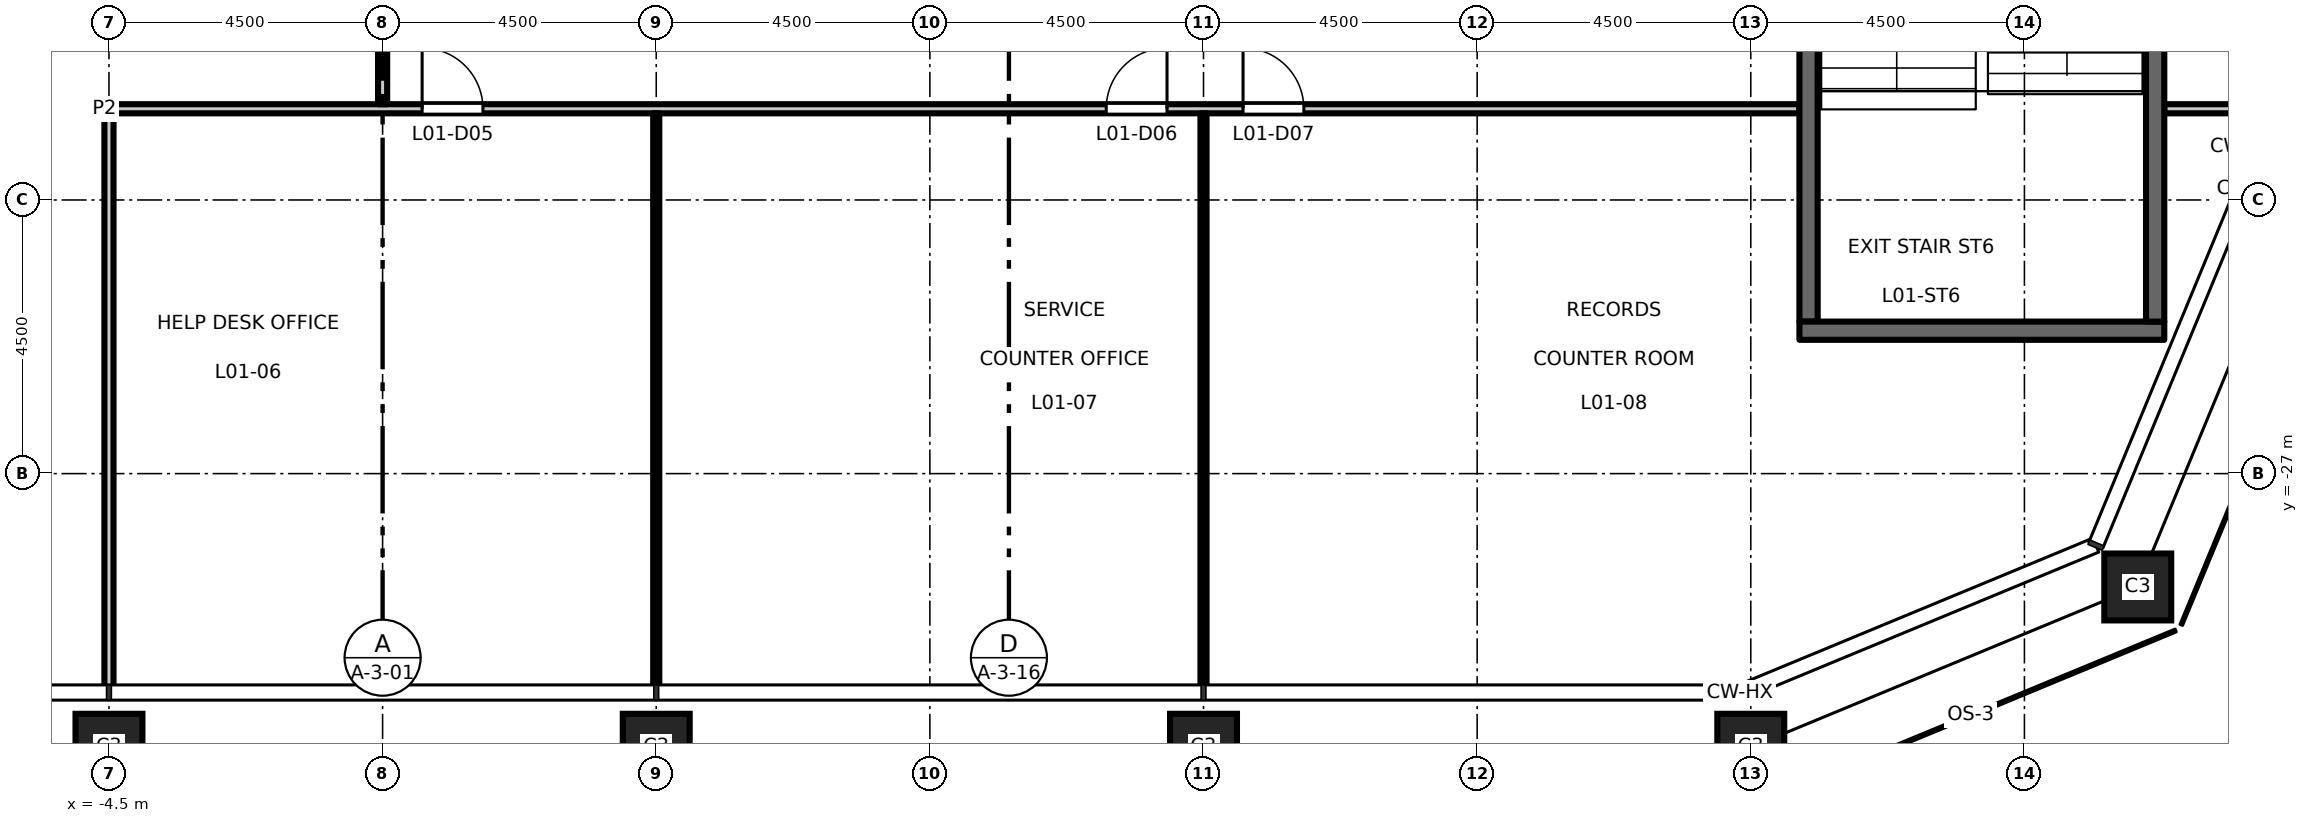
"""IFC4 building model, lengths in metres.
Left out: names, types, materials, properties, quantities, classifications, styles, units other than length and angle.
Written with IfcOpenShell. Run it as: python <this file> out.ifc"""

import sys

from ifc_helpers import new_model, si_unit, direction, frame, frame_2d, origin, origin_2d, place, context, subcontext, project, spatial, rectangle, hollow_rectangle, extrude, element, fill, save


model = new_model("IFC4")
c1 = context("Model", 3, precision=1e-05, world=origin(), true_north=direction((0.0, 1.0)))
c2 = subcontext(c1, "Body", "Model", "MODEL_VIEW")
j1 = project(units=[si_unit("LENGTHUNIT", "METRE"), si_unit("PLANEANGLEUNIT", "RADIAN")], contexts=[c1])
p1 = place(None, origin())
s1 = spatial("IfcSite", under=j1, at=p1, CompositionType="ELEMENT")
p2 = place(p1, origin())
s2 = spatial("IfcBuilding", under=s1, at=p2, CompositionType="ELEMENT")
p3 = place(p2, frame((0.0, 0.0, 7.2)))
s3 = spatial("IfcBuildingStorey", under=s2, at=p3, CompositionType="ELEMENT", Elevation=7.2)
for number, where, z_axis, x_axis in (
    (1, (-4.5, -31.5, 0.0), (0.0, 0.0, 1.0), (1.0, 0.0, 0.0)),
    (2, (4.5, -31.5, 0.0), (0.0, 0.0, 1.0), (1.0, 0.0, 0.0)),
    (3, (13.5, -31.5, 0.0), (0.0, 0.0, 1.0), (1.0, 0.0, 0.0)),
    (4, (22.5, -31.5, 0.0), (0.0, 0.0, 1.0), (1.0, 0.0, 0.0)),
    (5, (28.864, -28.864, 0.0), (0.0, 0.0, 1.0), (1.0, 0.0, 0.0)),
):
    element("IfcColumn", number, at=place(p3, frame(where, z_axis=z_axis, x_axis=x_axis)), inside=s3, PredefinedType="COLUMN", context=c2, shape_type="SweptSolid", body=[
        extrude(hollow_rectangle(XDim=1.1, YDim=1.1, WallThickness=0.07, at=origin_2d()), origin(), (0.0, 0.0, 1.0), 5.0),
    ])
p4 = place(p3, frame((23.45, -14.3, 0.0), z_axis=(0.0, 0.0, 1.0), x_axis=(0.0, -1.0, 0.0)))
e6 = element("IfcWall", 6, at=p4, inside=s3, PredefinedType="SHEAR", context=c2, shape_type="SweptSolid", body=[
    extrude(rectangle(XDim=10.2, YDim=0.3, at=frame_2d((5.1, 0.0))), origin(), (0.0, 0.0, 1.0), 4.8),
])
p5 = place(p4, frame((0.2, 0.0, 0.0)))
e7 = element("IfcOpeningElement", 7, at=p5, cuts=e6, PredefinedType="OPENING", context=c2, shape_type="SweptSolid", body=[
    extrude(rectangle(XDim=1.8, YDim=2.1, at=frame_2d((0.9, 1.05))), frame((0.0, 0.16, 0.0), z_axis=(0.0, -1.0, 0.0), x_axis=(1.0, 0.0, 0.0)), (0.0, 0.0, 1.0), 0.32),
])
p6 = place(p3, frame((29.3, -24.65, 0.0), z_axis=(0.0, 0.0, 1.0), x_axis=(-1.0, 0.0, 0.0)))
e8 = element("IfcWall", 8, at=p6, inside=s3, PredefinedType="SHEAR", context=c2, shape_type="SweptSolid", body=[
    extrude(rectangle(XDim=6.0, YDim=0.3, at=frame_2d((3.0, 0.0))), origin(), (0.0, 0.0, 1.0), 4.8),
])
p7 = place(p3, frame((29.15, -14.3, 0.0), z_axis=(0.0, 0.0, 1.0), x_axis=(0.0, -1.0, 0.0)))
e9 = element("IfcWall", 9, at=p7, inside=s3, PredefinedType="SHEAR", context=c2, shape_type="SweptSolid", body=[
    extrude(rectangle(XDim=10.2, YDim=0.3, at=frame_2d((5.1, 0.0))), origin(), (0.0, 0.0, 1.0), 4.8),
])
p8 = place(p3, frame((-4.575, -21.0, 0.0), z_axis=(0.0, 0.0, 1.0), x_axis=(1.0, 0.0, 0.0)))
e10 = element("IfcWall", 10, at=p8, inside=s3, PredefinedType="PARTITIONING", context=c2, shape_type="SweptSolid", body=[
    extrude(rectangle(XDim=27.875, YDim=0.15, at=frame_2d((13.938, 0.0))), origin(), (0.0, 0.0, 1.0), 4.8),
])
p9 = place(p8, frame((5.225, 0.0, 0.0)))
e11 = element("IfcOpeningElement", 11, at=p9, cuts=e10, PredefinedType="OPENING", context=c2, shape_type="SweptSolid", body=[
    extrude(rectangle(XDim=1.0, YDim=2.1, at=frame_2d((0.5, 1.05))), frame((0.0, 0.085, 0.0), z_axis=(0.0, -1.0, 0.0), x_axis=(1.0, 0.0, 0.0)), (0.0, 0.0, 1.0), 0.17),
])
p10 = place(p8, frame((16.475, 0.0, 0.0)))
e12 = element("IfcOpeningElement", 12, at=p10, cuts=e10, PredefinedType="OPENING", context=c2, shape_type="SweptSolid", body=[
    extrude(rectangle(XDim=1.0, YDim=2.1, at=frame_2d((0.5, 1.05))), frame((0.0, 0.085, 0.0), z_axis=(0.0, -1.0, 0.0), x_axis=(1.0, 0.0, 0.0)), (0.0, 0.0, 1.0), 0.17),
])
p11 = place(p8, frame((18.725, 0.0, 0.0)))
e13 = element("IfcOpeningElement", 13, at=p11, cuts=e10, PredefinedType="OPENING", context=c2, shape_type="SweptSolid", body=[
    extrude(rectangle(XDim=1.0, YDim=2.1, at=frame_2d((0.5, 1.05))), frame((0.0, 0.085, 0.0), z_axis=(0.0, -1.0, 0.0), x_axis=(1.0, 0.0, 0.0)), (0.0, 0.0, 1.0), 0.17),
])
p12 = place(p3, frame((29.3, -21.0, 0.0), z_axis=(0.0, 0.0, 1.0), x_axis=(1.0, 0.0, 0.0)))
e14 = element("IfcWall", 14, at=p12, inside=s3, PredefinedType="PARTITIONING", context=c2, shape_type="SweptSolid", body=[
    extrude(rectangle(XDim=1.21, YDim=0.15, at=frame_2d((0.605, 0.0))), origin(), (0.0, 0.0, 1.0), 4.8),
])
p13 = place(p3, frame((-4.5, -30.51, 0.0), z_axis=(0.0, 0.0, 1.0), x_axis=(0.0, 1.0, 0.0)))
e15 = element("IfcWall", 15, at=p13, inside=s3, PredefinedType="PARTITIONING", context=c2, shape_type="SweptSolid", body=[
    extrude(rectangle(XDim=9.435, YDim=0.15, at=frame_2d((4.718, 0.0))), origin(), (0.0, 0.0, 1.0), 3.8),
])
p14 = place(p3, frame((0.0, -20.925, 0.0), z_axis=(0.0, 0.0, 1.0), x_axis=(0.0, 1.0, 0.0)))
e16 = element("IfcWall", 16, at=p14, inside=s3, PredefinedType="PARTITIONING", context=c2, shape_type="SweptSolid", body=[
    extrude(rectangle(XDim=7.35, YDim=0.15, at=frame_2d((3.675, 0.0))), origin(), (0.0, 0.0, 1.0), 4.8),
])
for number, where, z_axis, x_axis in (
    (17, (4.5, -30.51, 0.0), (0.0, 0.0, 1.0), (0.0, 1.0, 0.0)),
    (18, (13.5, -30.51, 0.0), (0.0, 0.0, 1.0), (0.0, 1.0, 0.0)),
):
    element("IfcWall", number, at=place(p3, frame(where, z_axis=z_axis, x_axis=x_axis)), inside=s3, PredefinedType="PARTITIONING", context=c2, shape_type="SweptSolid", body=[
        extrude(rectangle(XDim=9.435, YDim=0.1, at=frame_2d((4.718, 0.0))), origin(), (0.0, 0.0, 1.0), 3.8),
    ])
p15 = place(p9, origin())
e19 = element("IfcDoor", 19, at=p15, inside=s3, OperationType="SINGLE_SWING_LEFT", PredefinedType="DOOR", context=c2, shape_type="SweptSolid", body=[
    extrude(rectangle(XDim=1.0, YDim=2.1, at=frame_2d((0.5, 1.05))), frame((0.0, 0.025, 0.0), z_axis=(0.0, -1.0, 0.0), x_axis=(1.0, 0.0, 0.0)), (0.0, 0.0, 1.0), 0.05),
])
fill(e11, e19)
p16 = place(p10, origin())
e20 = element("IfcDoor", 20, at=p16, inside=s3, OperationType="SINGLE_SWING_RIGHT", PredefinedType="DOOR", context=c2, shape_type="SweptSolid", body=[
    extrude(rectangle(XDim=1.0, YDim=2.1, at=frame_2d((0.5, 1.05))), frame((0.0, 0.025, 0.0), z_axis=(0.0, -1.0, 0.0), x_axis=(1.0, 0.0, 0.0)), (0.0, 0.0, 1.0), 0.05),
])
fill(e12, e20)
p17 = place(p11, origin())
e21 = element("IfcDoor", 21, at=p17, inside=s3, OperationType="SINGLE_SWING_LEFT", PredefinedType="DOOR", context=c2, shape_type="SweptSolid", body=[
    extrude(rectangle(XDim=1.0, YDim=2.1, at=frame_2d((0.5, 1.05))), frame((0.0, 0.025, 0.0), z_axis=(0.0, -1.0, 0.0), x_axis=(1.0, 0.0, 0.0)), (0.0, 0.0, 1.0), 0.05),
])
fill(e13, e21)
save(model, sys.argv[1])
